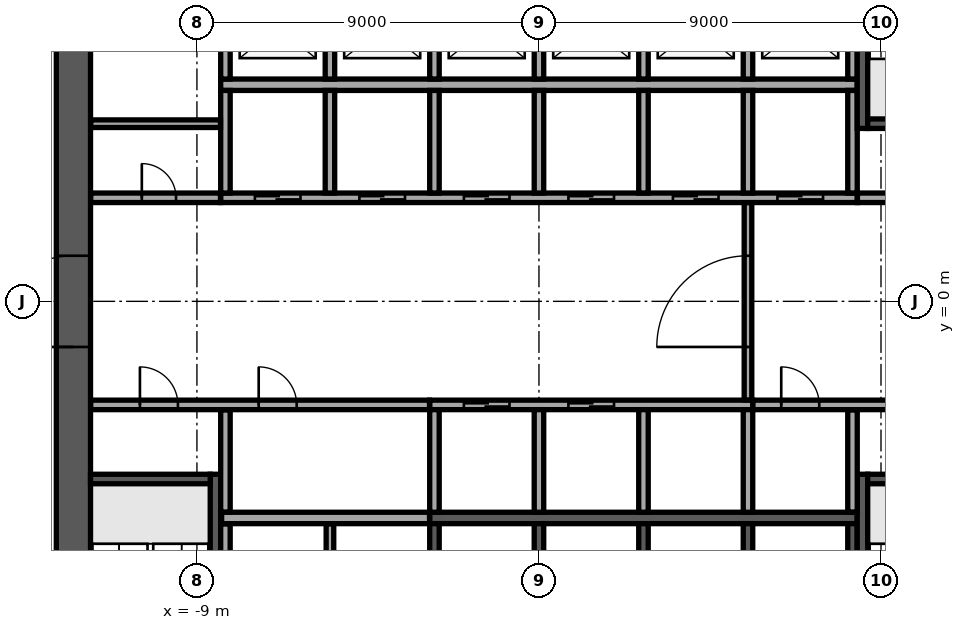
"""IFC4 building model, lengths in metres.
Left out: names, types, materials, properties, quantities, classifications, styles, units other than length and angle.
Written with IfcOpenShell. Run it as: python <this file> out.ifc"""

import sys

from ifc_helpers import new_model, si_unit, direction, frame, frame_2d, origin, place, context, subcontext, project, spatial, rectangle, extrude, element, fill, save


model = new_model("IFC4")
c1 = context("Model", 3, precision=1e-05, world=origin(), true_north=direction((0.0, 1.0)))
c2 = subcontext(c1, "Body", "Model", "MODEL_VIEW")
j1 = project(units=[si_unit("LENGTHUNIT", "METRE"), si_unit("PLANEANGLEUNIT", "RADIAN")], contexts=[c1])
p1 = place(None, origin())
s1 = spatial("IfcSite", under=j1, at=p1, CompositionType="ELEMENT")
p2 = place(p1, origin())
s2 = spatial("IfcBuilding", under=s1, at=p2, CompositionType="ELEMENT")
p3 = place(p2, frame((0.0, 0.0, 237.3)))
s3 = spatial("IfcBuildingStorey", under=s2, at=p3, CompositionType="ELEMENT", Elevation=237.3)
p4 = place(p3, frame((-12.25, -11.8, 0.0), z_axis=(0.0, 0.0, 1.0), x_axis=(0.0, 1.0, 0.0)))
e1 = element("IfcWall", 1, at=p4, inside=s3, PredefinedType="SHEAR", context=c2, shape_type="SweptSolid", body=[
    extrude(rectangle(XDim=23.6, YDim=0.9, at=frame_2d((11.8, 0.0))), origin(), (0.0, 0.0, 1.0), 5.24),
])
p5 = place(p4, frame((10.6, 0.0, 0.0)))
e2 = element("IfcOpeningElement", 2, at=p5, cuts=e1, PredefinedType="OPENING", context=c2, shape_type="SweptSolid", body=[
    extrude(rectangle(XDim=2.4, YDim=2.4, at=frame_2d((1.2, 1.2))), frame((0.0, 0.46, 0.0), z_axis=(0.0, -1.0, 0.0), x_axis=(1.0, 0.0, 0.0)), (0.0, 0.0, 1.0), 0.92),
])
p6 = place(p3, frame((-8.375, 5.7, 0.0), z_axis=(0.0, 0.0, 1.0), x_axis=(1.0, 0.0, 0.0)))
e3 = element("IfcWall", 3, at=p6, inside=s3, PredefinedType="SOLIDWALL", context=c2, shape_type="SweptSolid", body=[
    extrude(rectangle(XDim=16.75, YDim=0.3, at=frame_2d((8.375, 0.0))), origin(), (0.0, 0.0, 1.0), 5.24),
])
p7 = place(p3, frame((-2.875, -5.7, 0.0), z_axis=(0.0, 0.0, 1.0), x_axis=(1.0, 0.0, 0.0)))
e4 = element("IfcWall", 4, at=p7, inside=s3, PredefinedType="SOLIDWALL", context=c2, shape_type="SweptSolid", body=[
    extrude(rectangle(XDim=11.25, YDim=0.3, at=frame_2d((5.625, 0.0))), origin(), (0.0, 0.0, 1.0), 5.24),
])
p8 = place(p3, frame((-8.375, 2.725, 0.0), z_axis=(0.0, 0.0, 1.0), x_axis=(1.0, 0.0, 0.0)))
e5 = element("IfcWall", 5, at=p8, inside=s3, PredefinedType="SOLIDWALL", context=c2, shape_type="SweptSolid", body=[
    extrude(rectangle(XDim=16.75, YDim=0.25, at=frame_2d((8.375, 0.0))), origin(), (0.0, 0.0, 1.0), 5.24),
])
p9 = place(p8, frame((0.9, 0.0, 0.0)))
e6 = element("IfcOpeningElement", 6, at=p9, cuts=e5, PredefinedType="OPENING", context=c2, shape_type="SweptSolid", body=[
    extrude(rectangle(XDim=1.2, YDim=2.1, at=frame_2d((0.6, 1.05))), frame((0.0, 0.135, 0.0), z_axis=(0.0, -1.0, 0.0), x_axis=(1.0, 0.0, 0.0)), (0.0, 0.0, 1.0), 0.27),
])
p10 = place(p8, frame((3.65, 0.0, 0.0)))
e7 = element("IfcOpeningElement", 7, at=p10, cuts=e5, PredefinedType="OPENING", context=c2, shape_type="SweptSolid", body=[
    extrude(rectangle(XDim=1.2, YDim=2.1, at=frame_2d((0.6, 1.05))), frame((0.0, 0.135, 0.0), z_axis=(0.0, -1.0, 0.0), x_axis=(1.0, 0.0, 0.0)), (0.0, 0.0, 1.0), 0.27),
])
p11 = place(p8, frame((6.4, 0.0, 0.0)))
e8 = element("IfcOpeningElement", 8, at=p11, cuts=e5, PredefinedType="OPENING", context=c2, shape_type="SweptSolid", body=[
    extrude(rectangle(XDim=1.2, YDim=2.1, at=frame_2d((0.6, 1.05))), frame((0.0, 0.135, 0.0), z_axis=(0.0, -1.0, 0.0), x_axis=(1.0, 0.0, 0.0)), (0.0, 0.0, 1.0), 0.27),
])
p12 = place(p8, frame((9.15, 0.0, 0.0)))
e9 = element("IfcOpeningElement", 9, at=p12, cuts=e5, PredefinedType="OPENING", context=c2, shape_type="SweptSolid", body=[
    extrude(rectangle(XDim=1.2, YDim=2.1, at=frame_2d((0.6, 1.05))), frame((0.0, 0.135, 0.0), z_axis=(0.0, -1.0, 0.0), x_axis=(1.0, 0.0, 0.0)), (0.0, 0.0, 1.0), 0.27),
])
p13 = place(p8, frame((11.9, 0.0, 0.0)))
e10 = element("IfcOpeningElement", 10, at=p13, cuts=e5, PredefinedType="OPENING", context=c2, shape_type="SweptSolid", body=[
    extrude(rectangle(XDim=1.2, YDim=2.1, at=frame_2d((0.6, 1.05))), frame((0.0, 0.135, 0.0), z_axis=(0.0, -1.0, 0.0), x_axis=(1.0, 0.0, 0.0)), (0.0, 0.0, 1.0), 0.27),
])
p14 = place(p8, frame((14.65, 0.0, 0.0)))
e11 = element("IfcOpeningElement", 11, at=p14, cuts=e5, PredefinedType="OPENING", context=c2, shape_type="SweptSolid", body=[
    extrude(rectangle(XDim=1.2, YDim=2.1, at=frame_2d((0.6, 1.05))), frame((0.0, 0.135, 0.0), z_axis=(0.0, -1.0, 0.0), x_axis=(1.0, 0.0, 0.0)), (0.0, 0.0, 1.0), 0.27),
])
for number, where, z_axis, x_axis in (
    (12, (-8.25, 2.85, 0.0), (0.0, 0.0, 1.0), (0.0, 1.0, 0.0)),
    (13, (-5.5, 2.85, 0.0), (0.0, 0.0, 1.0), (0.0, 1.0, 0.0)),
    (14, (-2.75, 2.85, 0.0), (0.0, 0.0, 1.0), (0.0, 1.0, 0.0)),
    (15, (0.0, 2.85, 0.0), (0.0, 0.0, 1.0), (0.0, 1.0, 0.0)),
    (16, (2.75, 2.85, 0.0), (0.0, 0.0, 1.0), (0.0, 1.0, 0.0)),
    (17, (5.5, 2.85, 0.0), (0.0, 0.0, 1.0), (0.0, 1.0, 0.0)),
    (18, (8.25, 2.85, 0.0), (0.0, 0.0, 1.0), (0.0, 1.0, 0.0)),
    (19, (-8.25, 5.85, 0.0), (0.0, 0.0, 1.0), (0.0, 1.0, 0.0)),
    (20, (-5.5, 5.85, 0.0), (0.0, 0.0, 1.0), (0.0, 1.0, 0.0)),
    (21, (-2.75, 5.85, 0.0), (0.0, 0.0, 1.0), (0.0, 1.0, 0.0)),
    (22, (0.0, 5.85, 0.0), (0.0, 0.0, 1.0), (0.0, 1.0, 0.0)),
    (23, (2.75, 5.85, 0.0), (0.0, 0.0, 1.0), (0.0, 1.0, 0.0)),
    (24, (5.5, 5.85, 0.0), (0.0, 0.0, 1.0), (0.0, 1.0, 0.0)),
    (25, (8.25, 5.85, 0.0), (0.0, 0.0, 1.0), (0.0, 1.0, 0.0)),
):
    element("IfcWall", number, at=place(p3, frame(where, z_axis=z_axis, x_axis=x_axis)), inside=s3, PredefinedType="SOLIDWALL", context=c2, shape_type="SweptSolid", body=[
        extrude(rectangle(XDim=2.7, YDim=0.25, at=frame_2d((1.35, 0.0))), origin(), (0.0, 0.0, 1.0), 5.24),
    ])
p15 = place(p3, frame((-2.875, -2.725, 0.0), z_axis=(0.0, 0.0, 1.0), x_axis=(1.0, 0.0, 0.0)))
e26 = element("IfcWall", 26, at=p15, inside=s3, PredefinedType="SOLIDWALL", context=c2, shape_type="SweptSolid", body=[
    extrude(rectangle(XDim=8.5, YDim=0.25, at=frame_2d((4.25, 0.0))), origin(), (0.0, 0.0, 1.0), 5.24),
])
p16 = place(p15, frame((0.9, 0.0, 0.0)))
e27 = element("IfcOpeningElement", 27, at=p16, cuts=e26, PredefinedType="OPENING", context=c2, shape_type="SweptSolid", body=[
    extrude(rectangle(XDim=1.2, YDim=2.1, at=frame_2d((0.6, 1.05))), frame((0.0, 0.135, 0.0), z_axis=(0.0, -1.0, 0.0), x_axis=(1.0, 0.0, 0.0)), (0.0, 0.0, 1.0), 0.27),
])
p17 = place(p15, frame((3.65, 0.0, 0.0)))
e28 = element("IfcOpeningElement", 28, at=p17, cuts=e26, PredefinedType="OPENING", context=c2, shape_type="SweptSolid", body=[
    extrude(rectangle(XDim=1.2, YDim=2.1, at=frame_2d((0.6, 1.05))), frame((0.0, 0.135, 0.0), z_axis=(0.0, -1.0, 0.0), x_axis=(1.0, 0.0, 0.0)), (0.0, 0.0, 1.0), 0.27),
])
for number, where, z_axis, x_axis in (
    (29, (-2.75, -5.55, 0.0), (0.0, 0.0, 1.0), (0.0, 1.0, 0.0)),
    (30, (0.0, -5.55, 0.0), (0.0, 0.0, 1.0), (0.0, 1.0, 0.0)),
    (31, (2.75, -5.55, 0.0), (0.0, 0.0, 1.0), (0.0, 1.0, 0.0)),
    (32, (5.5, -5.55, 0.0), (0.0, 0.0, 1.0), (0.0, 1.0, 0.0)),
    (33, (-2.75, -8.55, 0.0), (0.0, 0.0, 1.0), (0.0, 1.0, 0.0)),
    (34, (0.0, -8.55, 0.0), (0.0, 0.0, 1.0), (0.0, 1.0, 0.0)),
    (35, (2.75, -8.55, 0.0), (0.0, 0.0, 1.0), (0.0, 1.0, 0.0)),
    (36, (5.5, -8.55, 0.0), (0.0, 0.0, 1.0), (0.0, 1.0, 0.0)),
    (37, (8.25, -8.55, 0.0), (0.0, 0.0, 1.0), (0.0, 1.0, 0.0)),
):
    element("IfcWall", number, at=place(p3, frame(where, z_axis=z_axis, x_axis=x_axis)), inside=s3, PredefinedType="SOLIDWALL", context=c2, shape_type="SweptSolid", body=[
        extrude(rectangle(XDim=2.7, YDim=0.25, at=frame_2d((1.35, 0.0))), origin(), (0.0, 0.0, 1.0), 5.24),
    ])
p18 = place(p3, frame((8.512, 4.55, 0.0), z_axis=(0.0, 0.0, 1.0), x_axis=(0.0, 1.0, 0.0)))
e38 = element("IfcWall", 38, at=p18, inside=s3, PredefinedType="SOLIDWALL", context=c2, shape_type="SweptSolid", body=[
    extrude(rectangle(XDim=7.25, YDim=0.275, at=frame_2d((3.625, 0.0))), origin(), (0.0, 0.0, 1.0), 5.24),
])
p19 = place(p18, frame((6.0, 0.0, 0.0)))
e39 = element("IfcOpeningElement", 39, at=p19, cuts=e38, PredefinedType="OPENING", context=c2, shape_type="SweptSolid", body=[
    extrude(rectangle(XDim=1.0, YDim=2.1, at=frame_2d((0.5, 1.05))), frame((0.0, 0.147, 0.0), z_axis=(0.0, -1.0, 0.0), x_axis=(1.0, 0.0, 0.0)), (0.0, 0.0, 1.0), 0.295),
])
p20 = place(p3, frame((8.65, 4.675, 0.0), z_axis=(0.0, 0.0, 1.0), x_axis=(1.0, 0.0, 0.0)))
e40 = element("IfcWall", 40, at=p20, inside=s3, PredefinedType="SOLIDWALL", context=c2, shape_type="SweptSolid", body=[
    extrude(rectangle(XDim=3.15, YDim=0.25, at=frame_2d((1.575, 0.0))), origin(), (0.0, 0.0, 1.0), 5.24),
])
p21 = place(p3, frame((-8.512, -4.55, 0.0), z_axis=(0.0, 0.0, 1.0), x_axis=(0.0, -1.0, 0.0)))
e41 = element("IfcWall", 41, at=p21, inside=s3, PredefinedType="SOLIDWALL", context=c2, shape_type="SweptSolid", body=[
    extrude(rectangle(XDim=7.25, YDim=0.275, at=frame_2d((3.625, 0.0))), origin(), (0.0, 0.0, 1.0), 5.24),
])
p22 = place(p21, frame((6.0, 0.0, 0.0)))
e42 = element("IfcOpeningElement", 42, at=p22, cuts=e41, PredefinedType="OPENING", context=c2, shape_type="SweptSolid", body=[
    extrude(rectangle(XDim=1.0, YDim=2.1, at=frame_2d((0.5, 1.05))), frame((0.0, 0.147, 0.0), z_axis=(0.0, -1.0, 0.0), x_axis=(1.0, 0.0, 0.0)), (0.0, 0.0, 1.0), 0.295),
])
p23 = place(p3, frame((-8.65, -4.675, 0.0), z_axis=(0.0, 0.0, 1.0), x_axis=(-1.0, 0.0, 0.0)))
e43 = element("IfcWall", 43, at=p23, inside=s3, PredefinedType="SOLIDWALL", context=c2, shape_type="SweptSolid", body=[
    extrude(rectangle(XDim=3.15, YDim=0.25, at=frame_2d((1.575, 0.0))), origin(), (0.0, 0.0, 1.0), 5.24),
])
p24 = place(p3, frame((8.512, -4.55, 0.0), z_axis=(0.0, 0.0, 1.0), x_axis=(0.0, -1.0, 0.0)))
e44 = element("IfcWall", 44, at=p24, inside=s3, PredefinedType="SOLIDWALL", context=c2, shape_type="SweptSolid", body=[
    extrude(rectangle(XDim=7.25, YDim=0.275, at=frame_2d((3.625, 0.0))), origin(), (0.0, 0.0, 1.0), 5.24),
])
p25 = place(p24, frame((6.0, 0.0, 0.0)))
e45 = element("IfcOpeningElement", 45, at=p25, cuts=e44, PredefinedType="OPENING", context=c2, shape_type="SweptSolid", body=[
    extrude(rectangle(XDim=1.0, YDim=2.1, at=frame_2d((0.5, 1.05))), frame((0.0, 0.147, 0.0), z_axis=(0.0, -1.0, 0.0), x_axis=(1.0, 0.0, 0.0)), (0.0, 0.0, 1.0), 0.295),
])
p26 = place(p3, frame((8.65, -4.675, 0.0), z_axis=(0.0, 0.0, 1.0), x_axis=(1.0, 0.0, 0.0)))
e46 = element("IfcWall", 46, at=p26, inside=s3, PredefinedType="SOLIDWALL", context=c2, shape_type="SweptSolid", body=[
    extrude(rectangle(XDim=3.15, YDim=0.25, at=frame_2d((1.575, 0.0))), origin(), (0.0, 0.0, 1.0), 5.24),
])
p27 = place(p3, frame((-8.25, -8.545, 0.0), z_axis=(0.0, 0.0, 1.0), x_axis=(0.0, 1.0, 0.0)))
e47 = element("IfcWall", 47, at=p27, inside=s3, PredefinedType="PARTITIONING", context=c2, shape_type="SweptSolid", body=[
    extrude(rectangle(XDim=2.69, YDim=0.25, at=frame_2d((1.345, 0.0))), origin(), (0.0, 0.0, 1.0), 5.24),
])
p28 = place(p3, frame((-5.5, -8.545, 0.0), z_axis=(0.0, 0.0, 1.0), x_axis=(0.0, 1.0, 0.0)))
e48 = element("IfcWall", 48, at=p28, inside=s3, PredefinedType="PARTITIONING", context=c2, shape_type="SweptSolid", body=[
    extrude(rectangle(XDim=2.69, YDim=0.2, at=frame_2d((1.345, 0.0))), origin(), (0.0, 0.0, 1.0), 5.24),
])
p29 = place(p3, frame((-8.35, -5.7, 0.0), z_axis=(0.0, 0.0, 1.0), x_axis=(1.0, 0.0, 0.0)))
e49 = element("IfcWall", 49, at=p29, inside=s3, PredefinedType="PARTITIONING", context=c2, shape_type="SweptSolid", body=[
    extrude(rectangle(XDim=5.47, YDim=0.3, at=frame_2d((2.735, 0.0))), origin(), (0.0, 0.0, 1.0), 5.24),
])
for number, where, z_axis, x_axis in (
    (50, (-8.25, -5.545, 0.0), (0.0, 0.0, 1.0), (0.0, 1.0, 0.0)),
    (51, (8.25, -5.545, 0.0), (0.0, 0.0, 1.0), (0.0, 1.0, 0.0)),
):
    element("IfcWall", number, at=place(p3, frame(where, z_axis=z_axis, x_axis=x_axis)), inside=s3, PredefinedType="PARTITIONING", context=c2, shape_type="SweptSolid", body=[
        extrude(rectangle(XDim=2.69, YDim=0.25, at=frame_2d((1.345, 0.0))), origin(), (0.0, 0.0, 1.0), 5.24),
    ])
p30 = place(p3, frame((-11.795, -2.725, 0.0), z_axis=(0.0, 0.0, 1.0), x_axis=(1.0, 0.0, 0.0)))
e52 = element("IfcWall", 52, at=p30, inside=s3, PredefinedType="PARTITIONING", context=c2, shape_type="SweptSolid", body=[
    extrude(rectangle(XDim=8.915, YDim=0.25, at=frame_2d((4.458, 0.0))), origin(), (0.0, 0.0, 1.0), 5.24),
])
p31 = place(p30, frame((1.295, 0.0, 0.0)))
e53 = element("IfcOpeningElement", 53, at=p31, cuts=e52, PredefinedType="OPENING", context=c2, shape_type="SweptSolid", body=[
    extrude(rectangle(XDim=1.0, YDim=2.1, at=frame_2d((0.5, 1.05))), frame((0.0, 0.135, 0.0), z_axis=(0.0, -1.0, 0.0), x_axis=(1.0, 0.0, 0.0)), (0.0, 0.0, 1.0), 0.27),
])
p32 = place(p30, frame((4.42, 0.0, 0.0)))
e54 = element("IfcOpeningElement", 54, at=p32, cuts=e52, PredefinedType="OPENING", context=c2, shape_type="SweptSolid", body=[
    extrude(rectangle(XDim=1.0, YDim=2.1, at=frame_2d((0.5, 1.05))), frame((0.0, 0.135, 0.0), z_axis=(0.0, -1.0, 0.0), x_axis=(1.0, 0.0, 0.0)), (0.0, 0.0, 1.0), 0.27),
])
p33 = place(p3, frame((5.63, -2.725, 0.0), z_axis=(0.0, 0.0, 1.0), x_axis=(1.0, 0.0, 0.0)))
e55 = element("IfcWall", 55, at=p33, inside=s3, PredefinedType="PARTITIONING", context=c2, shape_type="SweptSolid", body=[
    extrude(rectangle(XDim=6.165, YDim=0.25, at=frame_2d((3.083, 0.0))), origin(), (0.0, 0.0, 1.0), 5.24),
])
p34 = place(p33, frame((0.745, 0.0, 0.0)))
e56 = element("IfcOpeningElement", 56, at=p34, cuts=e55, PredefinedType="OPENING", context=c2, shape_type="SweptSolid", body=[
    extrude(rectangle(XDim=1.0, YDim=2.1, at=frame_2d((0.5, 1.05))), frame((0.0, 0.135, 0.0), z_axis=(0.0, -1.0, 0.0), x_axis=(1.0, 0.0, 0.0)), (0.0, 0.0, 1.0), 0.27),
])
p35 = place(p33, frame((3.92, 0.0, 0.0)))
e57 = element("IfcOpeningElement", 57, at=p35, cuts=e55, PredefinedType="OPENING", context=c2, shape_type="SweptSolid", body=[
    extrude(rectangle(XDim=0.9, YDim=2.1, at=frame_2d((0.45, 1.05))), frame((0.0, 0.135, 0.0), z_axis=(0.0, -1.0, 0.0), x_axis=(1.0, 0.0, 0.0)), (0.0, 0.0, 1.0), 0.27),
])
p36 = place(p3, frame((5.5, -2.595, 0.0), z_axis=(0.0, 0.0, 1.0), x_axis=(0.0, 1.0, 0.0)))
e58 = element("IfcWall", 58, at=p36, inside=s3, PredefinedType="PARTITIONING", context=c2, shape_type="SweptSolid", body=[
    extrude(rectangle(XDim=5.19, YDim=0.2, at=frame_2d((2.595, 0.0))), origin(), (0.0, 0.0, 1.0), 5.24),
])
p37 = place(p36, frame((1.395, 0.0, 0.0)))
e59 = element("IfcOpeningElement", 59, at=p37, cuts=e58, PredefinedType="OPENING", context=c2, shape_type="SweptSolid", body=[
    extrude(rectangle(XDim=2.4, YDim=2.4, at=frame_2d((1.2, 1.2))), frame((0.0, 0.11, 0.0), z_axis=(0.0, -1.0, 0.0), x_axis=(1.0, 0.0, 0.0)), (0.0, 0.0, 1.0), 0.22),
])
p38 = place(p3, frame((-11.795, 2.725, 0.0), z_axis=(0.0, 0.0, 1.0), x_axis=(1.0, 0.0, 0.0)))
e60 = element("IfcWall", 60, at=p38, inside=s3, PredefinedType="PARTITIONING", context=c2, shape_type="SweptSolid", body=[
    extrude(rectangle(XDim=3.415, YDim=0.25, at=frame_2d((1.708, 0.0))), origin(), (0.0, 0.0, 1.0), 5.24),
])
p39 = place(p38, frame((1.345, 0.0, 0.0)))
e61 = element("IfcOpeningElement", 61, at=p39, cuts=e60, PredefinedType="OPENING", context=c2, shape_type="SweptSolid", body=[
    extrude(rectangle(XDim=0.9, YDim=2.1, at=frame_2d((0.45, 1.05))), frame((0.0, 0.135, 0.0), z_axis=(0.0, -1.0, 0.0), x_axis=(1.0, 0.0, 0.0)), (0.0, 0.0, 1.0), 0.27),
])
p40 = place(p3, frame((8.38, 2.725, 0.0), z_axis=(0.0, 0.0, 1.0), x_axis=(1.0, 0.0, 0.0)))
e62 = element("IfcWall", 62, at=p40, inside=s3, PredefinedType="PARTITIONING", context=c2, shape_type="SweptSolid", body=[
    extrude(rectangle(XDim=3.415, YDim=0.25, at=frame_2d((1.708, 0.0))), origin(), (0.0, 0.0, 1.0), 5.24),
])
p41 = place(p40, frame((1.17, 0.0, 0.0)))
e63 = element("IfcOpeningElement", 63, at=p41, cuts=e62, PredefinedType="OPENING", context=c2, shape_type="SweptSolid", body=[
    extrude(rectangle(XDim=0.9, YDim=2.1, at=frame_2d((0.45, 1.05))), frame((0.0, 0.135, 0.0), z_axis=(0.0, -1.0, 0.0), x_axis=(1.0, 0.0, 0.0)), (0.0, 0.0, 1.0), 0.27),
])
p42 = place(p3, frame((-11.795, 4.675, 0.0), z_axis=(0.0, 0.0, 1.0), x_axis=(1.0, 0.0, 0.0)))
e64 = element("IfcWall", 64, at=p42, inside=s3, PredefinedType="PARTITIONING", context=c2, shape_type="SweptSolid", body=[
    extrude(rectangle(XDim=3.415, YDim=0.2, at=frame_2d((1.708, 0.0))), origin(), (0.0, 0.0, 1.0), 5.24),
])
p43 = place(p5, origin())
e65 = element("IfcDoor", 65, at=p43, inside=s3, OperationType="SINGLE_SWING_LEFT", PredefinedType="DOOR", context=c2, shape_type="SweptSolid", body=[
    extrude(rectangle(XDim=2.4, YDim=2.4, at=frame_2d((1.2, 1.2))), frame((0.0, 0.025, 0.0), z_axis=(0.0, -1.0, 0.0), x_axis=(1.0, 0.0, 0.0)), (0.0, 0.0, 1.0), 0.05),
])
fill(e2, e65)
p44 = place(p9, origin())
e66 = element("IfcDoor", 66, at=p44, inside=s3, OperationType="DOUBLE_DOOR_SLIDING", PredefinedType="DOOR", context=c2, shape_type="SweptSolid", body=[
    extrude(rectangle(XDim=1.2, YDim=2.1, at=frame_2d((0.6, 1.05))), frame((0.0, 0.025, 0.0), z_axis=(0.0, -1.0, 0.0), x_axis=(1.0, 0.0, 0.0)), (0.0, 0.0, 1.0), 0.05),
])
fill(e6, e66)
p45 = place(p10, origin())
e67 = element("IfcDoor", 67, at=p45, inside=s3, OperationType="DOUBLE_DOOR_SLIDING", PredefinedType="DOOR", context=c2, shape_type="SweptSolid", body=[
    extrude(rectangle(XDim=1.2, YDim=2.1, at=frame_2d((0.6, 1.05))), frame((0.0, 0.025, 0.0), z_axis=(0.0, -1.0, 0.0), x_axis=(1.0, 0.0, 0.0)), (0.0, 0.0, 1.0), 0.05),
])
fill(e7, e67)
p46 = place(p11, origin())
e68 = element("IfcDoor", 68, at=p46, inside=s3, OperationType="DOUBLE_DOOR_SLIDING", PredefinedType="DOOR", context=c2, shape_type="SweptSolid", body=[
    extrude(rectangle(XDim=1.2, YDim=2.1, at=frame_2d((0.6, 1.05))), frame((0.0, 0.025, 0.0), z_axis=(0.0, -1.0, 0.0), x_axis=(1.0, 0.0, 0.0)), (0.0, 0.0, 1.0), 0.05),
])
fill(e8, e68)
p47 = place(p12, origin())
e69 = element("IfcDoor", 69, at=p47, inside=s3, OperationType="DOUBLE_DOOR_SLIDING", PredefinedType="DOOR", context=c2, shape_type="SweptSolid", body=[
    extrude(rectangle(XDim=1.2, YDim=2.1, at=frame_2d((0.6, 1.05))), frame((0.0, 0.025, 0.0), z_axis=(0.0, -1.0, 0.0), x_axis=(1.0, 0.0, 0.0)), (0.0, 0.0, 1.0), 0.05),
])
fill(e9, e69)
p48 = place(p13, origin())
e70 = element("IfcDoor", 70, at=p48, inside=s3, OperationType="DOUBLE_DOOR_SLIDING", PredefinedType="DOOR", context=c2, shape_type="SweptSolid", body=[
    extrude(rectangle(XDim=1.2, YDim=2.1, at=frame_2d((0.6, 1.05))), frame((0.0, 0.025, 0.0), z_axis=(0.0, -1.0, 0.0), x_axis=(1.0, 0.0, 0.0)), (0.0, 0.0, 1.0), 0.05),
])
fill(e10, e70)
p49 = place(p14, origin())
e71 = element("IfcDoor", 71, at=p49, inside=s3, OperationType="DOUBLE_DOOR_SLIDING", PredefinedType="DOOR", context=c2, shape_type="SweptSolid", body=[
    extrude(rectangle(XDim=1.2, YDim=2.1, at=frame_2d((0.6, 1.05))), frame((0.0, 0.025, 0.0), z_axis=(0.0, -1.0, 0.0), x_axis=(1.0, 0.0, 0.0)), (0.0, 0.0, 1.0), 0.05),
])
fill(e11, e71)
p50 = place(p16, origin())
e72 = element("IfcDoor", 72, at=p50, inside=s3, OperationType="DOUBLE_DOOR_SLIDING", PredefinedType="DOOR", context=c2, shape_type="SweptSolid", body=[
    extrude(rectangle(XDim=1.2, YDim=2.1, at=frame_2d((0.6, 1.05))), frame((0.0, 0.025, 0.0), z_axis=(0.0, -1.0, 0.0), x_axis=(1.0, 0.0, 0.0)), (0.0, 0.0, 1.0), 0.05),
])
fill(e27, e72)
p51 = place(p17, origin())
e73 = element("IfcDoor", 73, at=p51, inside=s3, OperationType="DOUBLE_DOOR_SLIDING", PredefinedType="DOOR", context=c2, shape_type="SweptSolid", body=[
    extrude(rectangle(XDim=1.2, YDim=2.1, at=frame_2d((0.6, 1.05))), frame((0.0, 0.025, 0.0), z_axis=(0.0, -1.0, 0.0), x_axis=(1.0, 0.0, 0.0)), (0.0, 0.0, 1.0), 0.05),
])
fill(e28, e73)
p52 = place(p31, origin())
e74 = element("IfcDoor", 74, at=p52, inside=s3, OperationType="SINGLE_SWING_LEFT", PredefinedType="DOOR", context=c2, shape_type="SweptSolid", body=[
    extrude(rectangle(XDim=1.0, YDim=2.1, at=frame_2d((0.5, 1.05))), frame((0.0, 0.025, 0.0), z_axis=(0.0, -1.0, 0.0), x_axis=(1.0, 0.0, 0.0)), (0.0, 0.0, 1.0), 0.05),
])
fill(e53, e74)
p53 = place(p34, origin())
e75 = element("IfcDoor", 75, at=p53, inside=s3, OperationType="SINGLE_SWING_LEFT", PredefinedType="DOOR", context=c2, shape_type="SweptSolid", body=[
    extrude(rectangle(XDim=1.0, YDim=2.1, at=frame_2d((0.5, 1.05))), frame((0.0, 0.025, 0.0), z_axis=(0.0, -1.0, 0.0), x_axis=(1.0, 0.0, 0.0)), (0.0, 0.0, 1.0), 0.05),
])
fill(e56, e75)
p54 = place(p39, origin())
e76 = element("IfcDoor", 76, at=p54, inside=s3, OperationType="SINGLE_SWING_LEFT", PredefinedType="DOOR", context=c2, shape_type="SweptSolid", body=[
    extrude(rectangle(XDim=0.9, YDim=2.1, at=frame_2d((0.45, 1.05))), frame((0.0, 0.025, 0.0), z_axis=(0.0, -1.0, 0.0), x_axis=(1.0, 0.0, 0.0)), (0.0, 0.0, 1.0), 0.05),
])
fill(e61, e76)
p55 = place(p32, origin())
e77 = element("IfcDoor", 77, at=p55, inside=s3, OperationType="SINGLE_SWING_LEFT", PredefinedType="DOOR", context=c2, shape_type="SweptSolid", body=[
    extrude(rectangle(XDim=1.0, YDim=2.1, at=frame_2d((0.5, 1.05))), frame((0.0, 0.025, 0.0), z_axis=(0.0, -1.0, 0.0), x_axis=(1.0, 0.0, 0.0)), (0.0, 0.0, 1.0), 0.05),
])
fill(e54, e77)
p56 = place(p37, origin())
e78 = element("IfcDoor", 78, at=p56, inside=s3, OperationType="SINGLE_SWING_LEFT", PredefinedType="DOOR", context=c2, shape_type="SweptSolid", body=[
    extrude(rectangle(XDim=2.4, YDim=2.4, at=frame_2d((1.2, 1.2))), frame((0.0, 0.025, 0.0), z_axis=(0.0, -1.0, 0.0), x_axis=(1.0, 0.0, 0.0)), (0.0, 0.0, 1.0), 0.05),
])
fill(e59, e78)
save(model, sys.argv[1])
